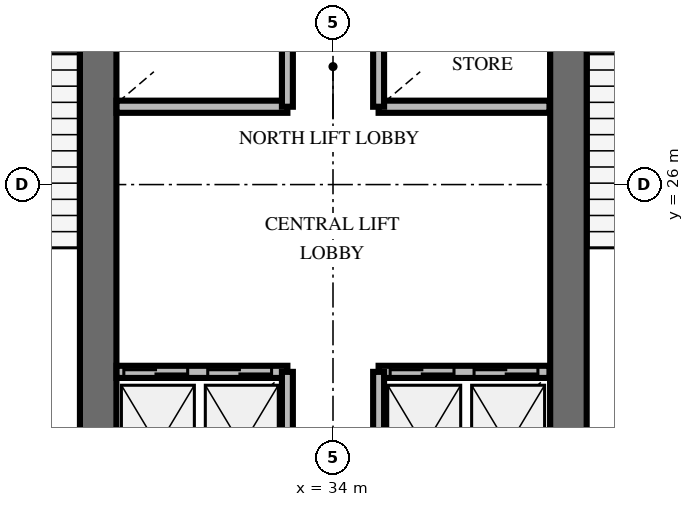
"""IFC4 building model, lengths in metres.
Left out: names, types, materials, properties, quantities, classifications, styles, units other than length and angle.
Written with IfcOpenShell. Run it as: python <this file> out.ifc"""

import sys

from ifc_helpers import new_model, si_unit, direction, frame, frame_2d, origin, place, context, subcontext, project, spatial, rectangle, extrude, element, fill, save


model = new_model("IFC4")
c1 = context("Model", 3, precision=1e-05, world=origin(), true_north=direction((0.0, 1.0)))
c2 = subcontext(c1, "Body", "Model", "MODEL_VIEW")
j1 = project(units=[si_unit("LENGTHUNIT", "METRE"), si_unit("PLANEANGLEUNIT", "RADIAN")], contexts=[c1])
p1 = place(None, origin())
s1 = spatial("IfcSite", under=j1, at=p1, CompositionType="ELEMENT")
p2 = place(p1, origin())
s2 = spatial("IfcBuilding", under=s1, at=p2, CompositionType="ELEMENT")
p3 = place(p2, frame((0.0, 0.0, 97.8)))
s3 = spatial("IfcBuildingStorey", under=s2, at=p3, CompositionType="ELEMENT", Elevation=97.8)
for number, where, z_axis, x_axis in (
    (1, (30.138, 20.187, 0.0), (0.0, 0.0, 1.0), (0.0, 1.0, 0.0)),
    (2, (37.872, 20.187, 0.0), (0.0, 0.0, 1.0), (0.0, 1.0, 0.0)),
):
    element("IfcWall", number, at=place(p3, frame(where, z_axis=z_axis, x_axis=x_axis)), inside=s3, PredefinedType="SHEAR", context=c2, shape_type="SweptSolid", body=[
        extrude(rectangle(XDim=9.826, YDim=0.6, at=frame_2d((4.913, 0.0))), origin(), (0.0, 0.0, 1.0), 4.0),
    ])
p4 = place(p3, frame((30.44, 22.92, 0.0), z_axis=(0.0, 0.0, 1.0), x_axis=(1.0, 0.0, 0.0)))
e3 = element("IfcWall", 3, at=p4, inside=s3, PredefinedType="SOLIDWALL", context=c2, shape_type="SweptSolid", body=[
    extrude(rectangle(XDim=2.81, YDim=0.2, at=frame_2d((1.405, 0.0))), origin(), (0.0, 0.0, 1.0), 2.8),
])
p5 = place(p4, frame((0.12, 0.0, 0.0)))
e4 = element("IfcOpeningElement", 4, at=p5, cuts=e3, PredefinedType="OPENING", context=c2, shape_type="SweptSolid", body=[
    extrude(rectangle(XDim=1.05, YDim=2.1, at=frame_2d((0.525, 1.05))), frame((0.0, 0.11, 0.0), z_axis=(0.0, -1.0, 0.0), x_axis=(1.0, 0.0, 0.0)), (0.0, 0.0, 1.0), 0.22),
])
p6 = place(p4, frame((1.5, 0.0, 0.0)))
e5 = element("IfcOpeningElement", 5, at=p6, cuts=e3, PredefinedType="OPENING", context=c2, shape_type="SweptSolid", body=[
    extrude(rectangle(XDim=1.05, YDim=2.1, at=frame_2d((0.525, 1.05))), frame((0.0, 0.11, 0.0), z_axis=(0.0, -1.0, 0.0), x_axis=(1.0, 0.0, 0.0)), (0.0, 0.0, 1.0), 0.22),
])
p7 = place(p3, frame((33.25, 20.5, 0.0), z_axis=(0.0, 0.0, 1.0), x_axis=(0.0, 1.0, 0.0)))
e6 = element("IfcWall", 6, at=p7, inside=s3, PredefinedType="SOLIDWALL", context=c2, shape_type="SweptSolid", body=[
    extrude(rectangle(XDim=2.42, YDim=0.18, at=frame_2d((1.21, 0.0))), origin(), (0.0, 0.0, 1.0), 2.8),
])
p8 = place(p3, frame((34.75, 22.92, 0.0), z_axis=(0.0, 0.0, 1.0), x_axis=(1.0, 0.0, 0.0)))
e7 = element("IfcWall", 7, at=p8, inside=s3, PredefinedType="SOLIDWALL", context=c2, shape_type="SweptSolid", body=[
    extrude(rectangle(XDim=2.81, YDim=0.2, at=frame_2d((1.405, 0.0))), origin(), (0.0, 0.0, 1.0), 2.8),
])
p9 = place(p8, frame((0.19, 0.0, 0.0)))
e8 = element("IfcOpeningElement", 8, at=p9, cuts=e7, PredefinedType="OPENING", context=c2, shape_type="SweptSolid", body=[
    extrude(rectangle(XDim=1.05, YDim=2.1, at=frame_2d((0.525, 1.05))), frame((0.0, 0.11, 0.0), z_axis=(0.0, -1.0, 0.0), x_axis=(1.0, 0.0, 0.0)), (0.0, 0.0, 1.0), 0.22),
])
p10 = place(p8, frame((1.57, 0.0, 0.0)))
e9 = element("IfcOpeningElement", 9, at=p10, cuts=e7, PredefinedType="OPENING", context=c2, shape_type="SweptSolid", body=[
    extrude(rectangle(XDim=1.05, YDim=2.1, at=frame_2d((0.525, 1.05))), frame((0.0, 0.11, 0.0), z_axis=(0.0, -1.0, 0.0), x_axis=(1.0, 0.0, 0.0)), (0.0, 0.0, 1.0), 0.22),
])
p11 = place(p3, frame((34.75, 20.5, 0.0), z_axis=(0.0, 0.0, 1.0), x_axis=(0.0, 1.0, 0.0)))
e10 = element("IfcWall", 10, at=p11, inside=s3, PredefinedType="SOLIDWALL", context=c2, shape_type="SweptSolid", body=[
    extrude(rectangle(XDim=2.42, YDim=0.18, at=frame_2d((1.21, 0.0))), origin(), (0.0, 0.0, 1.0), 2.8),
])
p12 = place(p3, frame((30.44, 27.28, 0.0), z_axis=(0.0, 0.0, 1.0), x_axis=(1.0, 0.0, 0.0)))
e11 = element("IfcWall", 11, at=p12, inside=s3, PredefinedType="SOLIDWALL", context=c2, shape_type="SweptSolid", body=[
    extrude(rectangle(XDim=2.81, YDim=0.2, at=frame_2d((1.405, 0.0))), origin(), (0.0, 0.0, 1.0), 2.8),
])
p13 = place(p3, frame((33.25, 27.28, 0.0), z_axis=(0.0, 0.0, 1.0), x_axis=(0.0, 1.0, 0.0)))
e12 = element("IfcWall", 12, at=p13, inside=s3, PredefinedType="SOLIDWALL", context=c2, shape_type="SweptSolid", body=[
    extrude(rectangle(XDim=2.47, YDim=0.18, at=frame_2d((1.235, 0.0))), origin(), (0.0, 0.0, 1.0), 2.8),
])
p14 = place(p3, frame((34.75, 27.28, 0.0), z_axis=(0.0, 0.0, 1.0), x_axis=(1.0, 0.0, 0.0)))
e13 = element("IfcWall", 13, at=p14, inside=s3, PredefinedType="SOLIDWALL", context=c2, shape_type="SweptSolid", body=[
    extrude(rectangle(XDim=2.81, YDim=0.2, at=frame_2d((1.405, 0.0))), origin(), (0.0, 0.0, 1.0), 2.8),
])
p15 = place(p3, frame((34.75, 27.28, 0.0), z_axis=(0.0, 0.0, 1.0), x_axis=(0.0, 1.0, 0.0)))
e14 = element("IfcWall", 14, at=p15, inside=s3, PredefinedType="SOLIDWALL", context=c2, shape_type="SweptSolid", body=[
    extrude(rectangle(XDim=2.47, YDim=0.18, at=frame_2d((1.235, 0.0))), origin(), (0.0, 0.0, 1.0), 2.8),
])
p16 = place(p5, origin())
e15 = element("IfcDoor", 15, at=p16, inside=s3, OperationType="DOUBLE_DOOR_SLIDING", PredefinedType="USERDEFINED", context=c2, shape_type="SweptSolid", body=[
    extrude(rectangle(XDim=1.05, YDim=2.1, at=frame_2d((0.525, 1.05))), frame((0.0, 0.025, 0.0), z_axis=(0.0, -1.0, 0.0), x_axis=(1.0, 0.0, 0.0)), (0.0, 0.0, 1.0), 0.05),
])
fill(e4, e15)
p17 = place(p6, origin())
e16 = element("IfcDoor", 16, at=p17, inside=s3, OperationType="DOUBLE_DOOR_SLIDING", PredefinedType="USERDEFINED", context=c2, shape_type="SweptSolid", body=[
    extrude(rectangle(XDim=1.05, YDim=2.1, at=frame_2d((0.525, 1.05))), frame((0.0, 0.025, 0.0), z_axis=(0.0, -1.0, 0.0), x_axis=(1.0, 0.0, 0.0)), (0.0, 0.0, 1.0), 0.05),
])
fill(e5, e16)
p18 = place(p9, origin())
e17 = element("IfcDoor", 17, at=p18, inside=s3, OperationType="DOUBLE_DOOR_SLIDING", PredefinedType="USERDEFINED", context=c2, shape_type="SweptSolid", body=[
    extrude(rectangle(XDim=1.05, YDim=2.1, at=frame_2d((0.525, 1.05))), frame((0.0, 0.025, 0.0), z_axis=(0.0, -1.0, 0.0), x_axis=(1.0, 0.0, 0.0)), (0.0, 0.0, 1.0), 0.05),
])
fill(e8, e17)
p19 = place(p10, origin())
e18 = element("IfcDoor", 18, at=p19, inside=s3, OperationType="DOUBLE_DOOR_SLIDING", PredefinedType="USERDEFINED", context=c2, shape_type="SweptSolid", body=[
    extrude(rectangle(XDim=1.05, YDim=2.1, at=frame_2d((0.525, 1.05))), frame((0.0, 0.025, 0.0), z_axis=(0.0, -1.0, 0.0), x_axis=(1.0, 0.0, 0.0)), (0.0, 0.0, 1.0), 0.05),
])
fill(e9, e18)
save(model, sys.argv[1])
